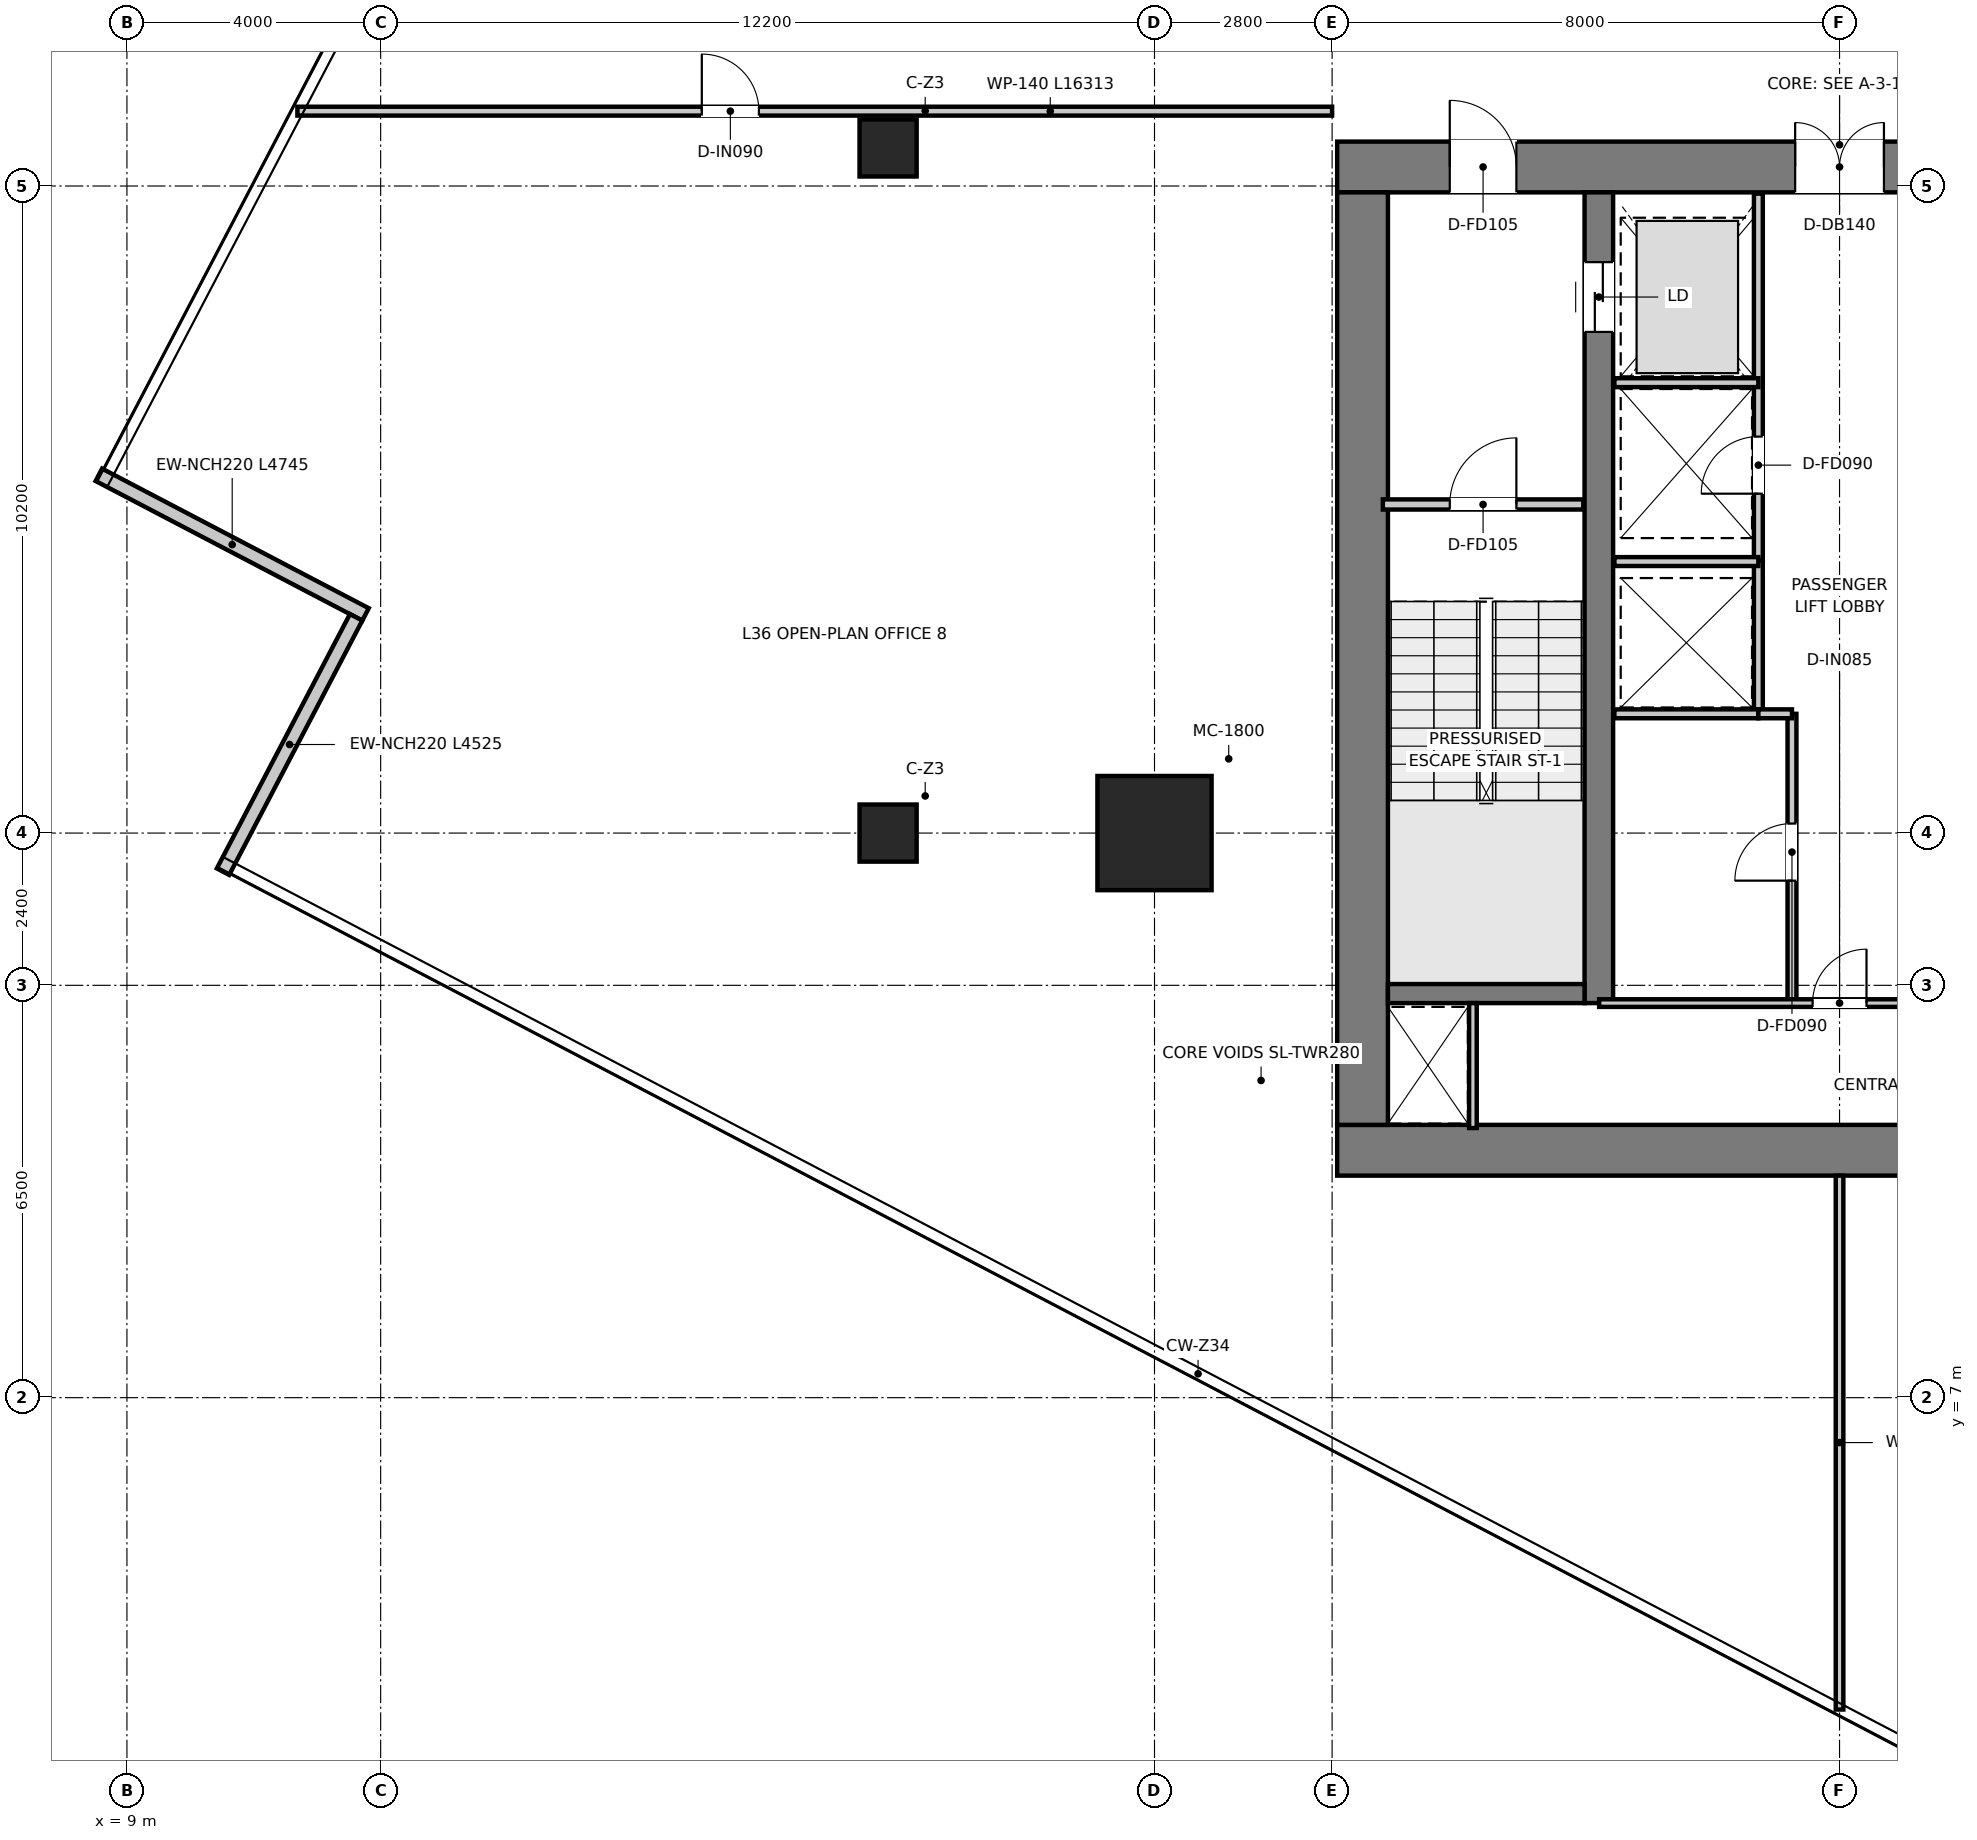
"""IFC4 building model, lengths in metres.
Left out: names, types, materials, properties, quantities, classifications, styles, units other than length and angle.
Written with IfcOpenShell. Run it as: python <this file> out.ifc"""

import sys

from ifc_helpers import new_model, si_unit, direction, frame, frame_2d, origin, origin_2d, place, context, subcontext, project, spatial, rectangle, extrude, source, transform, mapped, element, fill, save


model = new_model("IFC4")
c1 = context("Model", 3, precision=1e-05, world=origin(), true_north=direction((0.0, 1.0)))
c2 = subcontext(c1, "Body", "Model", "MODEL_VIEW")
j1 = project(units=[si_unit("LENGTHUNIT", "METRE"), si_unit("PLANEANGLEUNIT", "RADIAN")], contexts=[c1])
p1 = place(None, origin())
s1 = spatial("IfcSite", under=j1, at=p1, CompositionType="ELEMENT")
p2 = place(p1, origin())
s2 = spatial("IfcBuilding", under=s1, at=p2, CompositionType="ELEMENT")
p3 = place(p2, frame((0.0, 0.0, 150.15)))
s3 = spatial("IfcBuildingStorey", under=s2, at=p3, CompositionType="ELEMENT", Elevation=150.15)
p4 = place(p3, frame((28.08, 10.9, 0.0), z_axis=(0.0, 0.0, 1.0), x_axis=(1.0, 0.0, 0.0)))
e1 = element("IfcWall", 1, at=p4, inside=s3, PredefinedType="SHEAR", context=c2, shape_type="SweptSolid", body=[
    extrude(rectangle(XDim=15.84, YDim=0.8, at=frame_2d((7.92, 0.0))), origin(), (0.0, 0.0, 1.0), 3.95),
])
p5 = place(p3, frame((28.08, 26.4, 0.0), z_axis=(0.0, 0.0, 1.0), x_axis=(1.0, 0.0, 0.0)))
e2 = element("IfcWall", 2, at=p5, inside=s3, PredefinedType="SHEAR", context=c2, shape_type="SweptSolid", body=[
    extrude(rectangle(XDim=15.84, YDim=0.8, at=frame_2d((7.92, 0.0))), origin(), (0.0, 0.0, 1.0), 3.95),
])
p6 = place(p5, frame((7.22, 0.0, 0.0)))
e3 = element("IfcOpeningElement", 3, at=p6, cuts=e2, PredefinedType="OPENING", context=c2, shape_type="SweptSolid", body=[
    extrude(rectangle(XDim=1.4, YDim=2.2, at=frame_2d((0.7, 1.1))), frame((0.0, 0.41, 0.0), z_axis=(0.0, -1.0, 0.0), x_axis=(1.0, 0.0, 0.0)), (0.0, 0.0, 1.0), 0.82),
])
p7 = place(p5, frame((1.775, 0.0, 0.0)))
e4 = element("IfcOpeningElement", 4, at=p7, cuts=e2, PredefinedType="OPENING", context=c2, shape_type="SweptSolid", body=[
    extrude(rectangle(XDim=1.05, YDim=2.1, at=frame_2d((0.525, 1.05))), frame((0.0, 0.41, 0.0), z_axis=(0.0, -1.0, 0.0), x_axis=(1.0, 0.0, 0.0)), (0.0, 0.0, 1.0), 0.82),
])
p8 = place(p5, frame((13.015, 0.0, 0.0)))
e5 = element("IfcOpeningElement", 5, at=p8, cuts=e2, PredefinedType="OPENING", context=c2, shape_type="SweptSolid", body=[
    extrude(rectangle(XDim=1.05, YDim=2.1, at=frame_2d((0.525, 1.05))), frame((0.0, 0.41, 0.0), z_axis=(0.0, -1.0, 0.0), x_axis=(1.0, 0.0, 0.0)), (0.0, 0.0, 1.0), 0.82),
])
p9 = place(p3, frame((28.48, 11.3, 0.0), z_axis=(0.0, 0.0, 1.0), x_axis=(0.0, 1.0, 0.0)))
e6 = element("IfcWall", 6, at=p9, inside=s3, PredefinedType="SHEAR", context=c2, shape_type="SweptSolid", body=[
    extrude(rectangle(XDim=14.7, YDim=0.8, at=frame_2d((7.35, 0.0))), origin(), (0.0, 0.0, 1.0), 3.95),
])
p10 = place(p3, frame((32.205, 13.22, 0.0), z_axis=(0.0, 0.0, 1.0), x_axis=(0.0, 1.0, 0.0)))
e7 = element("IfcWall", 7, at=p10, inside=s3, PredefinedType="SHEAR", context=c2, shape_type="SweptSolid", body=[
    extrude(rectangle(XDim=12.78, YDim=0.45, at=frame_2d((6.39, 0.0))), origin(), (0.0, 0.0, 1.0), 3.95),
])
p11 = place(p10, frame((10.58, 0.0, 0.0)))
e8 = element("IfcOpeningElement", 8, at=p11, cuts=e7, PredefinedType="OPENING", context=c2, shape_type="SweptSolid", body=[
    extrude(rectangle(XDim=1.1, YDim=2.15, at=frame_2d((0.55, 1.075))), frame((0.0, 0.235, 0.0), z_axis=(0.0, -1.0, 0.0), x_axis=(1.0, 0.0, 0.0)), (0.0, 0.0, 1.0), 0.47),
])
p12 = place(p3, frame((28.88, 13.37, 0.0), z_axis=(0.0, 0.0, 1.0), x_axis=(1.0, 0.0, 0.0)))
e9 = element("IfcWall", 9, at=p12, inside=s3, PredefinedType="SHEAR", context=c2, shape_type="SweptSolid", body=[
    extrude(rectangle(XDim=3.1, YDim=0.3, at=frame_2d((1.55, 0.0))), origin(), (0.0, 0.0, 1.0), 3.95),
])
m1 = source(origin(), c2, "Body", "SweptSolid", [
    extrude(rectangle(XDim=1.8, YDim=1.8, at=origin_2d()), origin(), (0.0, 0.0, 1.0), 3.95),
])
p13 = place(p3, frame((25.2, 15.9, 0.0), z_axis=(0.0, 0.0, 1.0), x_axis=(1.0, 0.0, 0.0)))
e10 = element("IfcColumn", 10, at=p13, inside=s3, PredefinedType="USERDEFINED", context=c2, shape_type="MappedRepresentation", body=[
    mapped(m1, transform((0.0, 0.0, 0.0), x_axis=(1.0, 0.0, 0.0), y_axis=(0.0, 1.0, 0.0), z_axis=(0.0, 0.0, 1.0), scale=1.0)),
])
m2 = source(origin(), c2, "Body", "SweptSolid", [
    extrude(rectangle(XDim=0.9, YDim=0.9, at=origin_2d()), origin(), (0.0, 0.0, 1.0), 3.95),
])
for number, where, z_axis, x_axis in (
    (11, (21.0, 15.9, 0.0), (0.0, 0.0, 1.0), (1.0, 0.0, 0.0)),
    (12, (21.0, 26.7, 0.0), (0.0, 0.0, 1.0), (1.0, 0.0, 0.0)),
):
    element("IfcColumn", number, at=place(p3, frame(where, z_axis=z_axis, x_axis=x_axis)), inside=s3, PredefinedType="COLUMN", context=c2, shape_type="MappedRepresentation", body=[
        mapped(m2, transform((0.0, 0.0, 0.0), x_axis=(1.0, 0.0, 0.0), y_axis=(0.0, 1.0, 0.0), z_axis=(0.0, 0.0, 1.0), scale=1.0)),
    ])
p14 = place(p3, frame((8.557, 21.547, 0.0), z_axis=(0.0, 0.0, 1.0), x_axis=(0.886000663224, -0.463683970788, 0.0)))
e13 = element("IfcWall", 13, at=p14, inside=s3, PredefinedType="ELEMENTEDWALL", context=c2, shape_type="SweptSolid", body=[
    extrude(rectangle(XDim=4.745, YDim=0.22, at=frame_2d((2.373, 0.0))), origin(), (0.0, 0.0, 1.0), 3.67),
])
p15 = place(p3, frame((12.613, 19.301, 0.0), z_axis=(0.0, 0.0, 1.0), x_axis=(-0.463690434653, -0.885997280363, 0.0)))
e14 = element("IfcWall", 14, at=p15, inside=s3, PredefinedType="ELEMENTEDWALL", context=c2, shape_type="SweptSolid", body=[
    extrude(rectangle(XDim=4.525, YDim=0.22, at=frame_2d((2.262, 0.0))), origin(), (0.0, 0.0, 1.0), 3.67),
])
p16 = place(p3, frame((28.8, 21.08, 0.0), z_axis=(0.0, 0.0, 1.0), x_axis=(1.0, 0.0, 0.0)))
e15 = element("IfcWall", 15, at=p16, inside=s3, PredefinedType="PARTITIONING", context=c2, shape_type="SweptSolid", body=[
    extrude(rectangle(XDim=3.16, YDim=0.16, at=frame_2d((1.58, 0.0))), origin(), (0.0, 0.0, 1.0), 3.67),
])
p17 = place(p16, frame((1.055, 0.0, 0.0)))
e16 = element("IfcOpeningElement", 16, at=p17, cuts=e15, PredefinedType="OPENING", context=c2, shape_type="SweptSolid", body=[
    extrude(rectangle(XDim=1.05, YDim=2.1, at=frame_2d((0.525, 1.05))), frame((0.0, 0.09, 0.0), z_axis=(0.0, -1.0, 0.0), x_axis=(1.0, 0.0, 0.0)), (0.0, 0.0, 1.0), 0.18),
])
p18 = place(p3, frame((34.72, 20.2, 0.0), z_axis=(0.0, 0.0, 1.0), x_axis=(0.0, 1.0, 0.0)))
e17 = element("IfcWall", 17, at=p18, inside=s3, PredefinedType="PARTITIONING", context=c2, shape_type="SweptSolid", body=[
    extrude(rectangle(XDim=5.78, YDim=0.14, at=frame_2d((2.89, 0.0))), origin(), (0.0, 0.0, 1.0), 2.67),
])
p19 = place(p18, frame((1.05, 0.0, 0.0)))
e18 = element("IfcOpeningElement", 18, at=p19, cuts=e17, PredefinedType="OPENING", context=c2, shape_type="SweptSolid", body=[
    extrude(rectangle(XDim=0.9, YDim=2.1, at=frame_2d((0.45, 1.05))), frame((0.0, 0.08, 0.0), z_axis=(0.0, -1.0, 0.0), x_axis=(1.0, 0.0, 0.0)), (0.0, 0.0, 1.0), 0.16),
])
p20 = place(p3, frame((32.45, 23.0, 0.0), z_axis=(0.0, 0.0, 1.0), x_axis=(1.0, 0.0, 0.0)))
e19 = element("IfcWall", 19, at=p20, inside=s3, PredefinedType="PARTITIONING", context=c2, shape_type="SweptSolid", body=[
    extrude(rectangle(XDim=2.27, YDim=0.14, at=frame_2d((1.135, 0.0))), origin(), (0.0, 0.0, 1.0), 2.67),
])
p21 = place(p3, frame((34.72, 17.78, 0.0), z_axis=(0.0, 0.0, 1.0), x_axis=(0.0, 1.0, 0.0)))
e20 = element("IfcWall", 20, at=p21, inside=s3, PredefinedType="PARTITIONING", context=c2, shape_type="SweptSolid", body=[
    extrude(rectangle(XDim=2.42, YDim=0.14, at=frame_2d((1.21, 0.0))), origin(), (0.0, 0.0, 1.0), 3.67),
])
for number, where, z_axis, x_axis in (
    (21, (32.45, 17.78, 0.0), (0.0, 0.0, 1.0), (1.0, 0.0, 0.0)),
    (22, (32.45, 20.18, 0.0), (0.0, 0.0, 1.0), (1.0, 0.0, 0.0)),
):
    element("IfcWall", number, at=place(p3, frame(where, z_axis=z_axis, x_axis=x_axis)), inside=s3, PredefinedType="PARTITIONING", context=c2, shape_type="SweptSolid", body=[
        extrude(rectangle(XDim=2.27, YDim=0.14, at=frame_2d((1.135, 0.0))), origin(), (0.0, 0.0, 1.0), 3.67),
    ])
p22 = place(p3, frame((35.25, 13.22, 0.0), z_axis=(0.0, 0.0, 1.0), x_axis=(0.0, 1.0, 0.0)))
e23 = element("IfcWall", 23, at=p22, inside=s3, PredefinedType="PARTITIONING", context=c2, shape_type="SweptSolid", body=[
    extrude(rectangle(XDim=4.56, YDim=0.14, at=frame_2d((2.28, 0.0))), origin(), (0.0, 0.0, 1.0), 3.67),
])
p23 = place(p22, frame((1.93, 0.0, 0.0)))
e24 = element("IfcOpeningElement", 24, at=p23, cuts=e23, PredefinedType="OPENING", context=c2, shape_type="SweptSolid", body=[
    extrude(rectangle(XDim=0.9, YDim=2.1, at=frame_2d((0.45, 1.05))), frame((0.0, 0.08, 0.0), z_axis=(0.0, -1.0, 0.0), x_axis=(1.0, 0.0, 0.0)), (0.0, 0.0, 1.0), 0.16),
])
p24 = place(p3, frame((34.72, 17.78, 0.0), z_axis=(0.0, 0.0, 1.0), x_axis=(1.0, 0.0, 0.0)))
e25 = element("IfcWall", 25, at=p24, inside=s3, PredefinedType="PARTITIONING", context=c2, shape_type="SweptSolid", body=[
    extrude(rectangle(XDim=0.53, YDim=0.14, at=frame_2d((0.265, 0.0))), origin(), (0.0, 0.0, 1.0), 3.67),
])
p25 = place(p3, frame((30.22, 11.25, 0.0), z_axis=(0.0, 0.0, 1.0), x_axis=(0.0, 1.0, 0.0)))
e26 = element("IfcWall", 26, at=p25, inside=s3, PredefinedType="PARTITIONING", context=c2, shape_type="SweptSolid", body=[
    extrude(rectangle(XDim=1.97, YDim=0.12, at=frame_2d((0.985, 0.0))), origin(), (0.0, 0.0, 1.0), 3.67),
])
p26 = place(p3, frame((32.21, 13.22, 0.0), z_axis=(0.0, 0.0, 1.0), x_axis=(1.0, 0.0, 0.0)))
e27 = element("IfcWall", 27, at=p26, inside=s3, PredefinedType="PARTITIONING", context=c2, shape_type="SweptSolid", body=[
    extrude(rectangle(XDim=7.58, YDim=0.12, at=frame_2d((3.79, 0.0))), origin(), (0.0, 0.0, 1.0), 3.67),
])
p27 = place(p26, frame((3.365, 0.0, 0.0)))
e28 = element("IfcOpeningElement", 28, at=p27, cuts=e27, PredefinedType="OPENING", context=c2, shape_type="SweptSolid", body=[
    extrude(rectangle(XDim=0.85, YDim=2.1, at=frame_2d((0.425, 1.05))), frame((0.0, 0.07, 0.0), z_axis=(0.0, -1.0, 0.0), x_axis=(1.0, 0.0, 0.0)), (0.0, 0.0, 1.0), 0.14),
])
p28 = place(p3, frame((11.687, 27.28, 0.0), z_axis=(0.0, 0.0, 1.0), x_axis=(1.0, 0.0, 0.0)))
e29 = element("IfcWall", 29, at=p28, inside=s3, PredefinedType="PARTITIONING", context=c2, shape_type="SweptSolid", body=[
    extrude(rectangle(XDim=16.313, YDim=0.14, at=frame_2d((8.156, 0.0))), origin(), (0.0, 0.0, 1.0), 3.03),
])
p29 = place(p28, frame((6.376, 0.0, 0.0)))
e30 = element("IfcOpeningElement", 30, at=p29, cuts=e29, PredefinedType="OPENING", context=c2, shape_type="SweptSolid", body=[
    extrude(rectangle(XDim=0.9, YDim=2.1, at=frame_2d((0.45, 1.05))), frame((0.0, 0.08, 0.0), z_axis=(0.0, -1.0, 0.0), x_axis=(1.0, 0.0, 0.0)), (0.0, 0.0, 1.0), 0.16),
])
p30 = place(p3, frame((36.0, 2.084, 0.0), z_axis=(0.0, 0.0, 1.0), x_axis=(0.0, 1.0, 0.0)))
e31 = element("IfcWall", 31, at=p30, inside=s3, PredefinedType="PARTITIONING", context=c2, shape_type="SweptSolid", body=[
    extrude(rectangle(XDim=8.416, YDim=0.12, at=frame_2d((4.208, 0.0))), origin(), (0.0, 0.0, 1.0), 3.67),
])
p31 = place(p17, origin())
e32 = element("IfcDoor", 32, at=p31, inside=s3, OperationType="SINGLE_SWING_RIGHT", PredefinedType="DOOR", context=c2, shape_type="SweptSolid", body=[
    extrude(rectangle(XDim=1.05, YDim=2.1, at=frame_2d((0.525, 1.05))), frame((0.0, 0.025, 0.0), z_axis=(0.0, -1.0, 0.0), x_axis=(1.0, 0.0, 0.0)), (0.0, 0.0, 1.0), 0.05),
])
fill(e16, e32)
p32 = place(p6, origin())
e33 = element("IfcDoor", 33, at=p32, inside=s3, OperationType="DOUBLE_DOOR_SINGLE_SWING", PredefinedType="DOOR", context=c2, shape_type="SweptSolid", body=[
    extrude(rectangle(XDim=1.4, YDim=2.2, at=frame_2d((0.7, 1.1))), frame((0.0, 0.025, 0.0), z_axis=(0.0, -1.0, 0.0), x_axis=(1.0, 0.0, 0.0)), (0.0, 0.0, 1.0), 0.05),
])
fill(e3, e33)
p33 = place(p7, origin())
e34 = element("IfcDoor", 34, at=p33, inside=s3, OperationType="SINGLE_SWING_LEFT", PredefinedType="DOOR", context=c2, shape_type="SweptSolid", body=[
    extrude(rectangle(XDim=1.05, YDim=2.1, at=frame_2d((0.525, 1.05))), frame((0.0, 0.025, 0.0), z_axis=(0.0, -1.0, 0.0), x_axis=(1.0, 0.0, 0.0)), (0.0, 0.0, 1.0), 0.05),
])
fill(e4, e34)
p34 = place(p11, origin())
e35 = element("IfcDoor", 35, at=p34, inside=s3, OperationType="DOUBLE_DOOR_SLIDING", PredefinedType="DOOR", context=c2, shape_type="SweptSolid", body=[
    extrude(rectangle(XDim=1.1, YDim=2.15, at=frame_2d((0.55, 1.075))), frame((0.0, 0.025, 0.0), z_axis=(0.0, -1.0, 0.0), x_axis=(1.0, 0.0, 0.0)), (0.0, 0.0, 1.0), 0.05),
])
fill(e8, e35)
p35 = place(p19, origin())
e36 = element("IfcDoor", 36, at=p35, inside=s3, OperationType="SINGLE_SWING_LEFT", PredefinedType="DOOR", context=c2, shape_type="SweptSolid", body=[
    extrude(rectangle(XDim=0.9, YDim=2.1, at=frame_2d((0.45, 1.05))), frame((0.0, 0.025, 0.0), z_axis=(0.0, -1.0, 0.0), x_axis=(1.0, 0.0, 0.0)), (0.0, 0.0, 1.0), 0.05),
])
fill(e18, e36)
p36 = place(p23, origin())
e37 = element("IfcDoor", 37, at=p36, inside=s3, OperationType="SINGLE_SWING_LEFT", PredefinedType="DOOR", context=c2, shape_type="SweptSolid", body=[
    extrude(rectangle(XDim=0.9, YDim=2.1, at=frame_2d((0.45, 1.05))), frame((0.0, 0.025, 0.0), z_axis=(0.0, -1.0, 0.0), x_axis=(1.0, 0.0, 0.0)), (0.0, 0.0, 1.0), 0.05),
])
fill(e24, e37)
p37 = place(p27, origin())
e38 = element("IfcDoor", 38, at=p37, inside=s3, OperationType="SINGLE_SWING_RIGHT", PredefinedType="DOOR", context=c2, shape_type="SweptSolid", body=[
    extrude(rectangle(XDim=0.85, YDim=2.1, at=frame_2d((0.425, 1.05))), frame((0.0, 0.025, 0.0), z_axis=(0.0, -1.0, 0.0), x_axis=(1.0, 0.0, 0.0)), (0.0, 0.0, 1.0), 0.05),
])
fill(e28, e38)
p38 = place(p29, origin())
e39 = element("IfcDoor", 39, at=p38, inside=s3, OperationType="SINGLE_SWING_LEFT", PredefinedType="DOOR", context=c2, shape_type="SweptSolid", body=[
    extrude(rectangle(XDim=0.9, YDim=2.1, at=frame_2d((0.45, 1.05))), frame((0.0, 0.025, 0.0), z_axis=(0.0, -1.0, 0.0), x_axis=(1.0, 0.0, 0.0)), (0.0, 0.0, 1.0), 0.05),
])
fill(e30, e39)
save(model, sys.argv[1])
